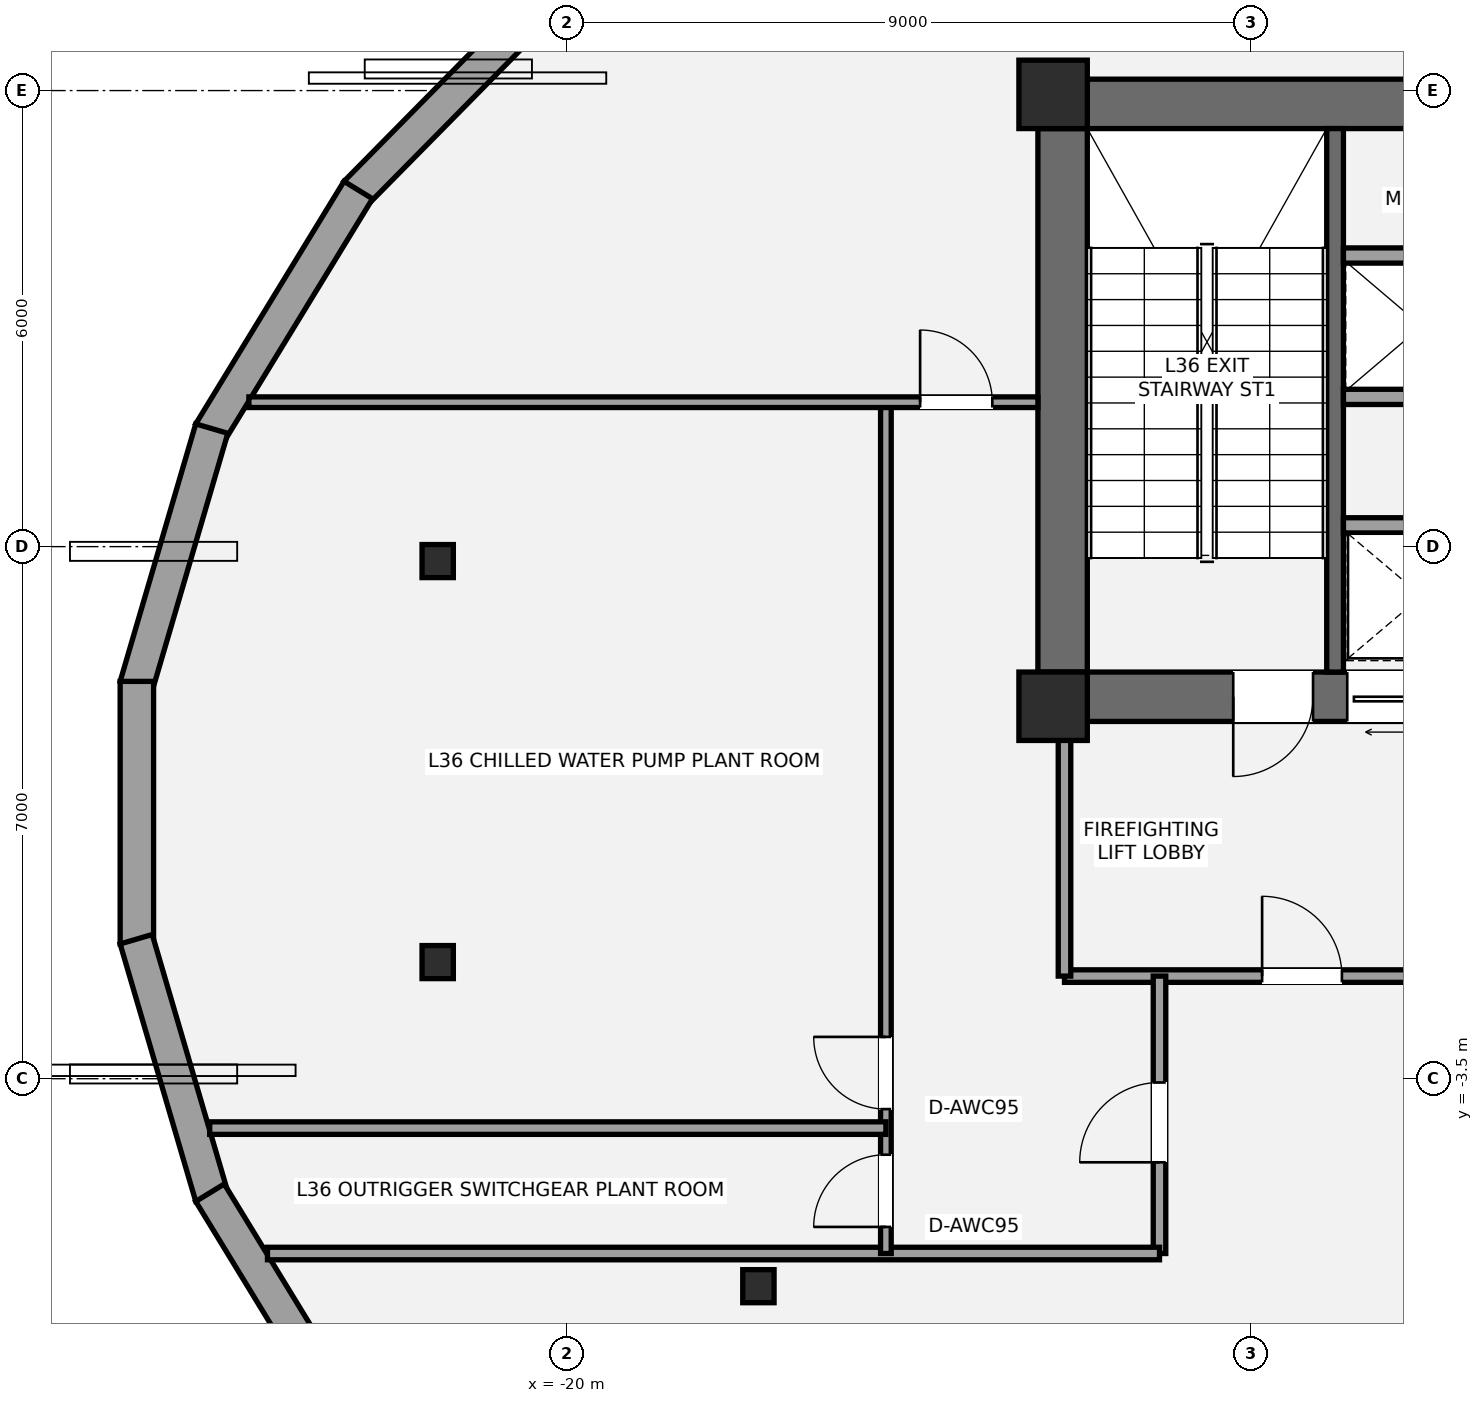
"""IFC4 building model, lengths in metres.
Left out: names, types, materials, properties, quantities, classifications, styles, units other than length and angle.
Written with IfcOpenShell. Run it as: python <this file> out.ifc"""

import sys

from ifc_helpers import new_model, si_unit, direction, frame, frame_2d, origin, origin_2d, place, context, subcontext, project, spatial, rectangle, i_section, extrude, element, fill, save


model = new_model("IFC4")
c1 = context("Model", 3, precision=1e-05, world=origin(), true_north=direction((0.0, 1.0)))
c2 = subcontext(c1, "Body", "Model", "MODEL_VIEW")
j1 = project(units=[si_unit("LENGTHUNIT", "METRE"), si_unit("PLANEANGLEUNIT", "RADIAN")], contexts=[c1])
p1 = place(None, origin())
s1 = spatial("IfcSite", under=j1, at=p1, CompositionType="ELEMENT")
p2 = place(p1, origin())
s2 = spatial("IfcBuilding", under=s1, at=p2, CompositionType="ELEMENT")
p3 = place(p2, frame((0.0, 0.0, 135.1)))
s3 = spatial("IfcBuildingStorey", under=s2, at=p3, CompositionType="ELEMENT", Elevation=135.1)
p4 = place(p3, frame((-13.475, 1.2, 0.0), z_axis=(0.0, 0.0, 1.0), x_axis=(0.0, 1.0, 0.0)))
e1 = element("IfcWall", 1, at=p4, inside=s3, PredefinedType="SHEAR", context=c2, shape_type="SweptSolid", body=[
    extrude(rectangle(XDim=8.45, YDim=0.65, at=frame_2d((4.225, 0.0))), origin(), (0.0, 0.0, 1.0), 4.5),
])
p5 = place(p3, frame((-13.8, 9.325, 0.0), z_axis=(0.0, 0.0, 1.0), x_axis=(1.0, 0.0, 0.0)))
e2 = element("IfcWall", 2, at=p5, inside=s3, PredefinedType="SHEAR", context=c2, shape_type="SweptSolid", body=[
    extrude(rectangle(XDim=9.325, YDim=0.65, at=frame_2d((4.663, 0.0))), origin(), (0.0, 0.0, 1.0), 4.5),
])
p6 = place(p3, frame((-4.875, 1.525, 0.0), z_axis=(0.0, 0.0, 1.0), x_axis=(-1.0, 0.0, 0.0)))
e3 = element("IfcWall", 3, at=p6, inside=s3, PredefinedType="SHEAR", context=c2, shape_type="SweptSolid", body=[
    extrude(rectangle(XDim=8.925, YDim=0.65, at=frame_2d((4.462, 0.0))), origin(), (0.0, 0.0, 1.0), 4.5),
])
p7 = place(p6, frame((5.305, 0.0, 0.0)))
e4 = element("IfcOpeningElement", 4, at=p7, cuts=e3, PredefinedType="OPENING", context=c2, shape_type="SweptSolid", body=[
    extrude(rectangle(XDim=1.05, YDim=2.15, at=frame_2d((0.525, 1.075))), frame((0.0, 0.335, 0.0), z_axis=(0.0, -1.0, 0.0), x_axis=(1.0, 0.0, 0.0)), (0.0, 0.0, 1.0), 0.67),
])
p8 = place(p6, frame((3.755, 0.0, 0.0)))
e5 = element("IfcOpeningElement", 5, at=p8, cuts=e3, PredefinedType="OPENING", context=c2, shape_type="SweptSolid", body=[
    extrude(rectangle(XDim=1.1, YDim=2.2, at=frame_2d((0.55, 1.1))), frame((0.0, 0.335, 0.0), z_axis=(0.0, -1.0, 0.0), x_axis=(1.0, 0.0, 0.0)), (0.0, 0.0, 1.0), 0.67),
])
p9 = place(p3, frame((-9.89, 1.85, 0.0), z_axis=(0.0, 0.0, 1.0), x_axis=(0.0, 1.0, 0.0)))
e6 = element("IfcWall", 6, at=p9, inside=s3, PredefinedType="SHEAR", context=c2, shape_type="SweptSolid", body=[
    extrude(rectangle(XDim=7.15, YDim=0.22, at=frame_2d((3.575, 0.0))), origin(), (0.0, 0.0, 1.0), 4.5),
])
for number, where, z_axis, x_axis in (
    (7, (-13.6, 1.4, 0.0), (0.0, 0.0, 1.0), (1.0, 0.0, 0.0)),
    (8, (-13.6, 9.45, 0.0), (0.0, 0.0, 1.0), (1.0, 0.0, 0.0)),
):
    element("IfcColumn", number, at=place(p3, frame(where, z_axis=z_axis, x_axis=x_axis)), inside=s3, PredefinedType="COLUMN", context=c2, shape_type="SweptSolid", body=[
        extrude(rectangle(XDim=0.9, YDim=0.9, at=origin_2d()), origin(), (0.0, 0.0, 1.0), 4.5),
    ])
for number, where, z_axis, x_axis in (
    (9, (-21.697, 3.31, 0.0), (0.0, 0.0, 1.0), (1.0, 0.0, 0.0)),
    (10, (-21.697, -1.966, 0.0), (0.0, 0.0, 1.0), (1.0, 0.0, 0.0)),
    (11, (-17.477, -6.229, 0.0), (0.0, 0.0, 1.0), (1.0, 0.0, 0.0)),
):
    element("IfcColumn", number, at=place(p3, frame(where, z_axis=z_axis, x_axis=x_axis)), inside=s3, PredefinedType="COLUMN", context=c2, shape_type="SweptSolid", body=[
        extrude(i_section(OverallWidth=0.412, OverallDepth=0.435, WebThickness=0.036, FlangeThickness=0.057, at=origin_2d()), origin(), (0.0, 0.0, 1.0), 4.5),
    ])
p10 = place(p3, frame((-22.773, 8.152, 0.0), z_axis=(0.0, 0.0, 1.0), x_axis=(0.702094935552, 0.712083352897, 0.0)))
e12 = element("IfcWall", 12, at=p10, inside=s3, PredefinedType="STANDARD", context=c2, shape_type="SweptSolid", body=[
    extrude(rectangle(XDim=4.033, YDim=0.44, at=frame_2d((2.017, 0.0))), origin(), (0.0, 0.0, 1.0), 3.498),
])
p11 = place(p3, frame((-24.693, 5.0, 0.0), z_axis=(0.0, 0.0, 1.0), x_axis=(0.521476412293, 0.853265698022, 0.0)))
e13 = element("IfcWall", 13, at=p11, inside=s3, PredefinedType="STANDARD", context=c2, shape_type="SweptSolid", body=[
    extrude(rectangle(XDim=3.74, YDim=0.44, at=frame_2d((1.87, 0.0))), origin(), (0.0, 0.0, 1.0), 3.498),
])
p12 = place(p3, frame((-25.664, 1.665, 0.0), z_axis=(0.0, 0.0, 1.0), x_axis=(0.28170956188, 0.959499725245, 0.0)))
e14 = element("IfcWall", 14, at=p12, inside=s3, PredefinedType="STANDARD", context=c2, shape_type="SweptSolid", body=[
    extrude(rectangle(XDim=3.531, YDim=0.44, at=frame_2d((1.765, 0.0))), origin(), (0.0, 0.0, 1.0), 3.498),
])
p13 = place(p3, frame((-25.655, -1.727, 0.0), z_axis=(0.0, 0.0, 1.0), x_axis=(0.0, 1.0, 0.0)))
e15 = element("IfcWall", 15, at=p13, inside=s3, PredefinedType="STANDARD", context=c2, shape_type="SweptSolid", body=[
    extrude(rectangle(XDim=3.454, YDim=0.44, at=frame_2d((1.727, 0.0))), origin(), (0.0, 0.0, 1.0), 3.498),
])
p14 = place(p3, frame((-24.669, -5.053, 0.0), z_axis=(0.0, 0.0, 1.0), x_axis=(-0.28170956188, 0.959499725245, 0.0)))
e16 = element("IfcWall", 16, at=p14, inside=s3, PredefinedType="STANDARD", context=c2, shape_type="SweptSolid", body=[
    extrude(rectangle(XDim=3.531, YDim=0.44, at=frame_2d((1.765, 0.0))), origin(), (0.0, 0.0, 1.0), 3.498),
])
p15 = place(p3, frame((-22.742, -8.191, 0.0), z_axis=(0.0, 0.0, 1.0), x_axis=(-0.521476412293, 0.853265698022, 0.0)))
e17 = element("IfcWall", 17, at=p15, inside=s3, PredefinedType="STANDARD", context=c2, shape_type="SweptSolid", body=[
    extrude(rectangle(XDim=3.74, YDim=0.44, at=frame_2d((1.87, 0.0))), origin(), (0.0, 0.0, 1.0), 3.498),
])
p16 = place(p3, frame((-13.45, -2.15, 0.0), z_axis=(0.0, 0.0, 1.0), x_axis=(1.0, 0.0, 0.0)))
e18 = element("IfcWall", 18, at=p16, inside=s3, PredefinedType="PARTITIONING", context=c2, shape_type="SweptSolid", body=[
    extrude(rectangle(XDim=6.25, YDim=0.165, at=frame_2d((3.125, 0.0))), origin(), (0.0, 0.0, 1.0), 4.28),
])
p17 = place(p16, frame((2.6, 0.0, 0.0)))
e19 = element("IfcOpeningElement", 19, at=p17, cuts=e18, PredefinedType="OPENING", context=c2, shape_type="SweptSolid", body=[
    extrude(rectangle(XDim=1.05, YDim=2.15, at=frame_2d((0.525, 1.075))), frame((0.0, 0.093, 0.0), z_axis=(0.0, -1.0, 0.0), x_axis=(1.0, 0.0, 0.0)), (0.0, 0.0, 1.0), 0.185),
])
p18 = place(p3, frame((-13.45, -2.15, 0.0), z_axis=(0.0, 0.0, 1.0), x_axis=(0.0, 1.0, 0.0)))
e20 = element("IfcWall", 20, at=p18, inside=s3, PredefinedType="PARTITIONING", context=c2, shape_type="SweptSolid", body=[
    extrude(rectangle(XDim=3.4, YDim=0.165, at=frame_2d((1.7, 0.0))), origin(), (0.0, 0.0, 1.0), 2.47),
])
for number, where, z_axis, x_axis in (
    (21, (-9.78, 3.78, 0.0), (0.0, 0.0, 1.0), (1.0, 0.0, 0.0)),
    (22, (-9.78, 5.47, 0.0), (0.0, 0.0, 1.0), (1.0, 0.0, 0.0)),
    (23, (-9.78, 7.33, 0.0), (0.0, 0.0, 1.0), (1.0, 0.0, 0.0)),
):
    element("IfcWall", number, at=place(p3, frame(where, z_axis=z_axis, x_axis=x_axis)), inside=s3, PredefinedType="SOLIDWALL", context=c2, shape_type="SweptSolid", body=[
        extrude(rectangle(XDim=4.255, YDim=0.2, at=frame_2d((2.127, 0.0))), origin(), (0.0, 0.0, 1.0), 4.28),
    ])
p19 = place(p3, frame((-12.2, -5.8, 0.0), z_axis=(0.0, 0.0, 1.0), x_axis=(0.0, 1.0, 0.0)))
e24 = element("IfcWall", 24, at=p19, inside=s3, PredefinedType="PARTITIONING", context=c2, shape_type="SweptSolid", body=[
    extrude(rectangle(XDim=3.65, YDim=0.165, at=frame_2d((1.825, 0.0))), origin(), (0.0, 0.0, 1.0), 4.28),
])
p20 = place(p19, frame((1.2, 0.0, 0.0)))
e25 = element("IfcOpeningElement", 25, at=p20, cuts=e24, PredefinedType="OPENING", context=c2, shape_type="SweptSolid", body=[
    extrude(rectangle(XDim=1.05, YDim=2.15, at=frame_2d((0.525, 1.075))), frame((0.0, 0.093, 0.0), z_axis=(0.0, -1.0, 0.0), x_axis=(1.0, 0.0, 0.0)), (0.0, 0.0, 1.0), 0.185),
])
p21 = place(p3, frame((-23.937, -5.8, 0.0), z_axis=(0.0, 0.0, 1.0), x_axis=(1.0, 0.0, 0.0)))
e26 = element("IfcWall", 26, at=p21, inside=s3, PredefinedType="PARTITIONING", context=c2, shape_type="SweptSolid", body=[
    extrude(rectangle(XDim=11.737, YDim=0.165, at=frame_2d((5.868, 0.0))), origin(), (0.0, 0.0, 1.0), 2.47),
])
p22 = place(p3, frame((-15.8, -5.8, 0.0), z_axis=(0.0, 0.0, 1.0), x_axis=(0.0, 1.0, 0.0)))
e27 = element("IfcWall", 27, at=p22, inside=s3, PredefinedType="PARTITIONING", context=c2, shape_type="SweptSolid", body=[
    extrude(rectangle(XDim=11.2, YDim=0.14, at=frame_2d((5.6, 0.0))), origin(), (0.0, 0.0, 1.0), 2.47),
])
p23 = place(p22, frame((0.35, 0.0, 0.0)))
e28 = element("IfcOpeningElement", 28, at=p23, cuts=e27, PredefinedType="OPENING", context=c2, shape_type="SweptSolid", body=[
    extrude(rectangle(XDim=0.95, YDim=2.15, at=frame_2d((0.475, 1.075))), frame((0.0, 0.08, 0.0), z_axis=(0.0, -1.0, 0.0), x_axis=(1.0, 0.0, 0.0)), (0.0, 0.0, 1.0), 0.16),
])
p24 = place(p22, frame((1.9, 0.0, 0.0)))
e29 = element("IfcOpeningElement", 29, at=p24, cuts=e27, PredefinedType="OPENING", context=c2, shape_type="SweptSolid", body=[
    extrude(rectangle(XDim=0.95, YDim=2.15, at=frame_2d((0.475, 1.075))), frame((0.0, 0.08, 0.0), z_axis=(0.0, -1.0, 0.0), x_axis=(1.0, 0.0, 0.0)), (0.0, 0.0, 1.0), 0.16),
])
p25 = place(p3, frame((-24.181, 5.4, 0.0), z_axis=(0.0, 0.0, 1.0), x_axis=(1.0, 0.0, 0.0)))
e30 = element("IfcWall", 30, at=p25, inside=s3, PredefinedType="PARTITIONING", context=c2, shape_type="SweptSolid", body=[
    extrude(rectangle(XDim=10.381, YDim=0.14, at=frame_2d((5.19, 0.0))), origin(), (0.0, 0.0, 1.0), 4.28),
])
p26 = place(p25, frame((8.831, 0.0, 0.0)))
e31 = element("IfcOpeningElement", 31, at=p26, cuts=e30, PredefinedType="OPENING", context=c2, shape_type="SweptSolid", body=[
    extrude(rectangle(XDim=0.95, YDim=2.15, at=frame_2d((0.475, 1.075))), frame((0.0, 0.08, 0.0), z_axis=(0.0, -1.0, 0.0), x_axis=(1.0, 0.0, 0.0)), (0.0, 0.0, 1.0), 0.16),
])
p27 = place(p3, frame((-24.697, -4.15, 0.0), z_axis=(0.0, 0.0, 1.0), x_axis=(1.0, 0.0, 0.0)))
e32 = element("IfcWall", 32, at=p27, inside=s3, PredefinedType="PARTITIONING", context=c2, shape_type="SweptSolid", body=[
    extrude(rectangle(XDim=8.897, YDim=0.165, at=frame_2d((4.448, 0.0))), origin(), (0.0, 0.0, 1.0), 2.47),
])
p28 = place(p7, origin())
e33 = element("IfcDoor", 33, at=p28, inside=s3, OperationType="SINGLE_SWING_RIGHT", PredefinedType="DOOR", context=c2, shape_type="SweptSolid", body=[
    extrude(rectangle(XDim=1.05, YDim=2.15, at=frame_2d((0.525, 1.075))), frame((0.0, 0.025, 0.0), z_axis=(0.0, -1.0, 0.0), x_axis=(1.0, 0.0, 0.0)), (0.0, 0.0, 1.0), 0.05),
])
fill(e4, e33)
p29 = place(p8, origin())
e34 = element("IfcDoor", 34, at=p29, inside=s3, OperationType="SLIDING_TO_LEFT", PredefinedType="DOOR", context=c2, shape_type="SweptSolid", body=[
    extrude(rectangle(XDim=1.1, YDim=2.2, at=frame_2d((0.55, 1.1))), frame((0.0, 0.025, 0.0), z_axis=(0.0, -1.0, 0.0), x_axis=(1.0, 0.0, 0.0)), (0.0, 0.0, 1.0), 0.05),
])
fill(e5, e34)
p30 = place(p17, origin())
e35 = element("IfcDoor", 35, at=p30, inside=s3, OperationType="SINGLE_SWING_LEFT", PredefinedType="DOOR", context=c2, shape_type="SweptSolid", body=[
    extrude(rectangle(XDim=1.05, YDim=2.15, at=frame_2d((0.525, 1.075))), frame((0.0, 0.025, 0.0), z_axis=(0.0, -1.0, 0.0), x_axis=(1.0, 0.0, 0.0)), (0.0, 0.0, 1.0), 0.05),
])
fill(e19, e35)
p31 = place(p20, origin())
e36 = element("IfcDoor", 36, at=p31, inside=s3, OperationType="SINGLE_SWING_LEFT", PredefinedType="DOOR", context=c2, shape_type="SweptSolid", body=[
    extrude(rectangle(XDim=1.05, YDim=2.15, at=frame_2d((0.525, 1.075))), frame((0.0, 0.025, 0.0), z_axis=(0.0, -1.0, 0.0), x_axis=(1.0, 0.0, 0.0)), (0.0, 0.0, 1.0), 0.05),
])
fill(e25, e36)
p32 = place(p23, origin())
e37 = element("IfcDoor", 37, at=p32, inside=s3, OperationType="SINGLE_SWING_LEFT", PredefinedType="DOOR", context=c2, shape_type="SweptSolid", body=[
    extrude(rectangle(XDim=0.95, YDim=2.15, at=frame_2d((0.475, 1.075))), frame((0.0, 0.025, 0.0), z_axis=(0.0, -1.0, 0.0), x_axis=(1.0, 0.0, 0.0)), (0.0, 0.0, 1.0), 0.05),
])
fill(e28, e37)
p33 = place(p24, origin())
e38 = element("IfcDoor", 38, at=p33, inside=s3, OperationType="SINGLE_SWING_RIGHT", PredefinedType="DOOR", context=c2, shape_type="SweptSolid", body=[
    extrude(rectangle(XDim=0.95, YDim=2.15, at=frame_2d((0.475, 1.075))), frame((0.0, 0.025, 0.0), z_axis=(0.0, -1.0, 0.0), x_axis=(1.0, 0.0, 0.0)), (0.0, 0.0, 1.0), 0.05),
])
fill(e29, e38)
p34 = place(p26, origin())
e39 = element("IfcDoor", 39, at=p34, inside=s3, OperationType="SINGLE_SWING_LEFT", PredefinedType="DOOR", context=c2, shape_type="SweptSolid", body=[
    extrude(rectangle(XDim=0.95, YDim=2.15, at=frame_2d((0.475, 1.075))), frame((0.0, 0.025, 0.0), z_axis=(0.0, -1.0, 0.0), x_axis=(1.0, 0.0, 0.0)), (0.0, 0.0, 1.0), 0.05),
])
fill(e31, e39)
save(model, sys.argv[1])
